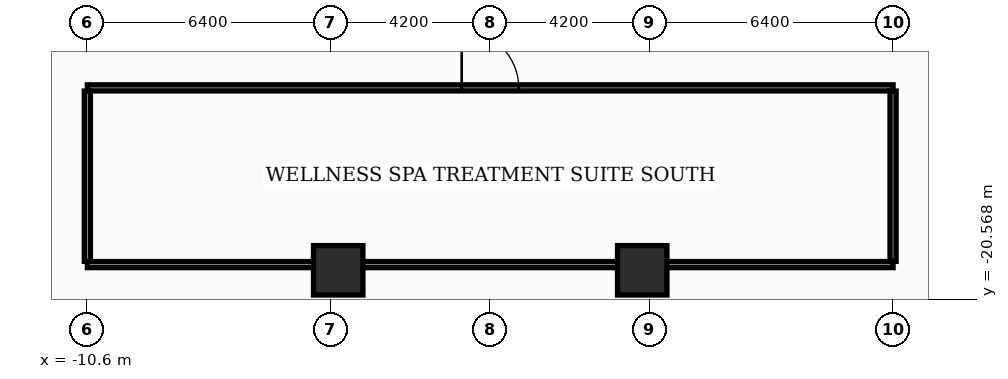
"""IFC4 building model, lengths in metres.
Left out: names, types, materials, properties, quantities, classifications, styles, units other than length and angle.
Written with IfcOpenShell. Run it as: python <this file> out.ifc"""

import sys

from ifc_helpers import new_model, si_unit, direction, frame, frame_2d, origin, origin_2d, place, context, subcontext, project, spatial, rectangle, extrude, element, fill, save


model = new_model("IFC4")
c1 = context("Model", 3, precision=1e-05, world=origin(), true_north=direction((0.0, 1.0)))
c2 = subcontext(c1, "Body", "Model", "MODEL_VIEW")
j1 = project(units=[si_unit("LENGTHUNIT", "METRE"), si_unit("PLANEANGLEUNIT", "RADIAN")], contexts=[c1])
p1 = place(None, origin())
s1 = spatial("IfcSite", under=j1, at=p1, CompositionType="ELEMENT")
p2 = place(p1, origin())
s2 = spatial("IfcBuilding", under=s1, at=p2, CompositionType="ELEMENT")
p3 = place(p2, frame((0.0, 0.0, 19.2)))
s3 = spatial("IfcBuildingStorey", under=s2, at=p3, CompositionType="ELEMENT", Elevation=19.2)
for number, where, z_axis, x_axis in (
    (1, (-4.0, -19.8, 0.0), (0.0, 0.0, 1.0), (1.0, 0.0, 0.0)),
    (2, (4.0, -19.8, 0.0), (0.0, 0.0, 1.0), (1.0, 0.0, 0.0)),
):
    element("IfcColumn", number, at=place(p3, frame(where, z_axis=z_axis, x_axis=x_axis)), inside=s3, PredefinedType="COLUMN", context=c2, shape_type="SweptSolid", body=[
        extrude(rectangle(XDim=1.3, YDim=1.3, at=origin_2d()), origin(), (0.0, 0.0, 1.0), 4.5),
    ])
p4 = place(p3, frame((-10.6, -19.65, 0.0), z_axis=(0.0, 0.0, 1.0), x_axis=(1.0, 0.0, 0.0)))
e3 = element("IfcWall", 3, at=p4, inside=s3, PredefinedType="PARTITIONING", context=c2, shape_type="SweptSolid", body=[
    extrude(rectangle(XDim=21.2, YDim=0.16, at=frame_2d((10.6, 0.0))), origin(), (0.0, 0.0, 1.0), 3.37),
])
p5 = place(p3, frame((-10.6, -15.0, 0.0), z_axis=(0.0, 0.0, 1.0), x_axis=(1.0, 0.0, 0.0)))
e4 = element("IfcWall", 4, at=p5, inside=s3, PredefinedType="PARTITIONING", context=c2, shape_type="SweptSolid", body=[
    extrude(rectangle(XDim=21.2, YDim=0.16, at=frame_2d((10.6, 0.0))), origin(), (0.0, 0.0, 1.0), 3.37),
])
p6 = place(p5, frame((9.85, 0.0, 0.0)))
e5 = element("IfcOpeningElement", 5, at=p6, cuts=e4, PredefinedType="OPENING", context=c2, shape_type="SweptSolid", body=[
    extrude(rectangle(XDim=1.5, YDim=2.15, at=frame_2d((0.75, 1.075))), frame((0.0, 0.09, 0.0), z_axis=(0.0, -1.0, 0.0), x_axis=(1.0, 0.0, 0.0)), (0.0, 0.0, 1.0), 0.18),
])
for number, where, z_axis, x_axis in (
    (6, (-10.6, -19.565, 0.0), (0.0, 0.0, 1.0), (0.0, 1.0, 0.0)),
    (7, (10.6, -19.565, 0.0), (0.0, 0.0, 1.0), (0.0, 1.0, 0.0)),
):
    element("IfcWall", number, at=place(p3, frame(where, z_axis=z_axis, x_axis=x_axis)), inside=s3, PredefinedType="PARTITIONING", context=c2, shape_type="SweptSolid", body=[
        extrude(rectangle(XDim=4.48, YDim=0.16, at=frame_2d((2.24, 0.0))), origin(), (0.0, 0.0, 1.0), 3.37),
    ])
p7 = place(p6, origin())
e8 = element("IfcDoor", 8, at=p7, inside=s3, OperationType="DOUBLE_DOOR_SINGLE_SWING", PredefinedType="DOOR", context=c2, shape_type="SweptSolid", body=[
    extrude(rectangle(XDim=1.5, YDim=2.15, at=frame_2d((0.75, 1.075))), frame((0.0, 0.025, 0.0), z_axis=(0.0, -1.0, 0.0), x_axis=(1.0, 0.0, 0.0)), (0.0, 0.0, 1.0), 0.05),
])
fill(e5, e8)
save(model, sys.argv[1])
